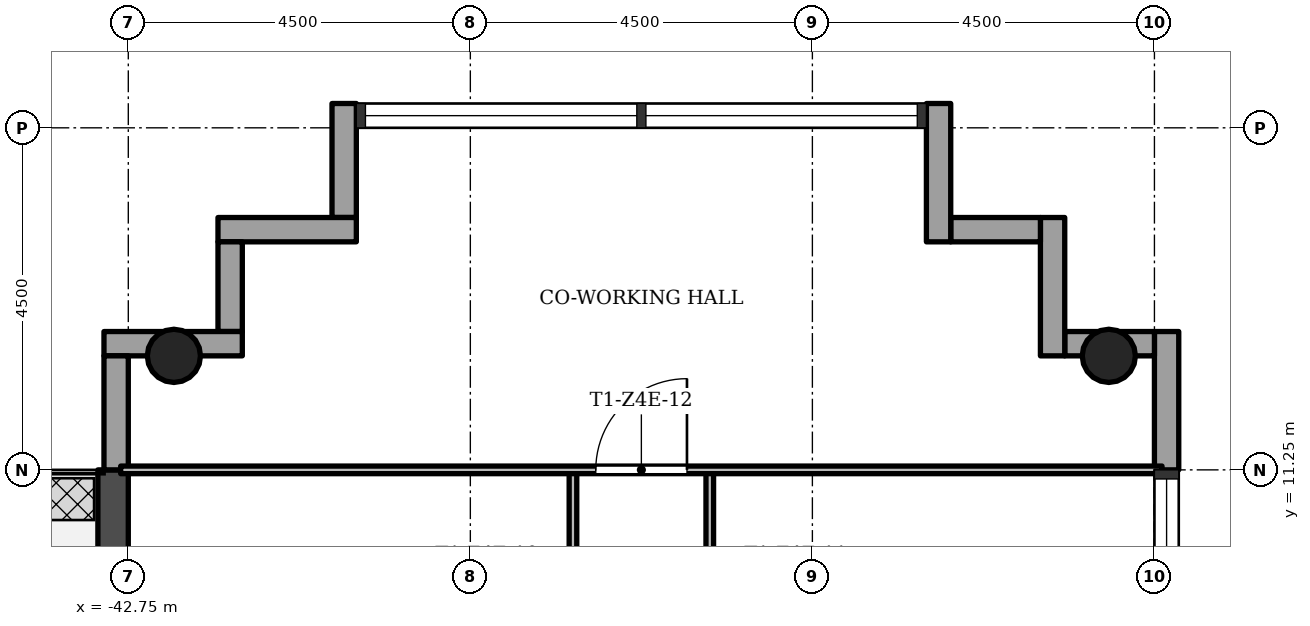
"""IFC4 building model, lengths in metres.
Left out: names, types, materials, properties, quantities, classifications, styles, units other than length and angle.
Written with IfcOpenShell. Run it as: python <this file> out.ifc"""

import sys

from ifc_helpers import new_model, si_unit, direction, frame, frame_2d, origin, origin_2d, place, context, subcontext, project, spatial, rectangle, hollow_circle, extrude, element, fill, save


model = new_model("IFC4")
c1 = context("Model", 3, precision=1e-05, world=origin(), true_north=direction((0.0, 1.0)))
c2 = subcontext(c1, "Body", "Model", "MODEL_VIEW")
j1 = project(units=[si_unit("LENGTHUNIT", "METRE"), si_unit("PLANEANGLEUNIT", "RADIAN")], contexts=[c1])
p1 = place(None, origin())
s1 = spatial("IfcSite", under=j1, at=p1, CompositionType="ELEMENT")
p2 = place(p1, origin())
s2 = spatial("IfcBuilding", under=s1, at=p2, CompositionType="ELEMENT")
p3 = place(p2, frame((0.0, 0.0, 213.0)))
s3 = spatial("IfcBuildingStorey", under=s2, at=p3, CompositionType="ELEMENT", Elevation=213.0)
for number, where, z_axis, x_axis in (
    (1, (-29.85, 12.75, 0.0), (0.0, 0.0, 1.0), (1.0, 0.0, 0.0)),
    (2, (-42.15, 12.75, 0.0), (0.0, 0.0, 1.0), (1.0, 0.0, 0.0)),
):
    element("IfcColumn", number, at=place(p3, frame(where, z_axis=z_axis, x_axis=x_axis)), inside=s3, PredefinedType="COLUMN", context=c2, shape_type="SweptSolid", body=[
        extrude(hollow_circle(Radius=0.35, WallThickness=0.025, at=origin_2d()), origin(), (0.0, 0.0, 1.0), 3.4),
    ])
p4 = place(p3, frame((-29.09, 11.25, -0.3), z_axis=(0.0, 0.0, 1.0), x_axis=(0.0, 1.0, 0.0)))
e3 = element("IfcWall", 3, at=p4, inside=s3, PredefinedType="STANDARD", context=c2, shape_type="SweptSolid", body=[
    extrude(rectangle(XDim=1.82, YDim=0.32, at=frame_2d((0.91, 0.0))), origin(), (0.0, 0.0, 1.0), 3.4),
])
p5 = place(p3, frame((-29.25, 12.91, -0.3), z_axis=(0.0, 0.0, 1.0), x_axis=(-1.0, 0.0, 0.0)))
e4 = element("IfcWall", 4, at=p5, inside=s3, PredefinedType="STANDARD", context=c2, shape_type="SweptSolid", body=[
    extrude(rectangle(XDim=1.18, YDim=0.32, at=frame_2d((0.59, 0.0))), origin(), (0.0, 0.0, 1.0), 3.4),
])
p6 = place(p3, frame((-30.59, 12.75, -0.3), z_axis=(0.0, 0.0, 1.0), x_axis=(0.0, 1.0, 0.0)))
e5 = element("IfcWall", 5, at=p6, inside=s3, PredefinedType="STANDARD", context=c2, shape_type="SweptSolid", body=[
    extrude(rectangle(XDim=1.82, YDim=0.32, at=frame_2d((0.91, 0.0))), origin(), (0.0, 0.0, 1.0), 3.4),
])
p7 = place(p3, frame((-30.75, 14.41, -0.3), z_axis=(0.0, 0.0, 1.0), x_axis=(-1.0, 0.0, 0.0)))
e6 = element("IfcWall", 6, at=p7, inside=s3, PredefinedType="STANDARD", context=c2, shape_type="SweptSolid", body=[
    extrude(rectangle(XDim=1.18, YDim=0.32, at=frame_2d((0.59, 0.0))), origin(), (0.0, 0.0, 1.0), 3.4),
])
p8 = place(p3, frame((-32.09, 14.25, -0.3), z_axis=(0.0, 0.0, 1.0), x_axis=(0.0, 1.0, 0.0)))
e7 = element("IfcWall", 7, at=p8, inside=s3, PredefinedType="STANDARD", context=c2, shape_type="SweptSolid", body=[
    extrude(rectangle(XDim=1.82, YDim=0.32, at=frame_2d((0.91, 0.0))), origin(), (0.0, 0.0, 1.0), 3.4),
])
p9 = place(p3, frame((-39.91, 16.07, -0.3), z_axis=(0.0, 0.0, 1.0), x_axis=(0.0, -1.0, 0.0)))
e8 = element("IfcWall", 8, at=p9, inside=s3, PredefinedType="STANDARD", context=c2, shape_type="SweptSolid", body=[
    extrude(rectangle(XDim=1.5, YDim=0.32, at=frame_2d((0.75, 0.0))), origin(), (0.0, 0.0, 1.0), 3.4),
])
p10 = place(p3, frame((-39.75, 14.41, -0.3), z_axis=(0.0, 0.0, 1.0), x_axis=(-1.0, 0.0, 0.0)))
e9 = element("IfcWall", 9, at=p10, inside=s3, PredefinedType="STANDARD", context=c2, shape_type="SweptSolid", body=[
    extrude(rectangle(XDim=1.82, YDim=0.32, at=frame_2d((0.91, 0.0))), origin(), (0.0, 0.0, 1.0), 3.4),
])
p11 = place(p3, frame((-41.41, 14.25, -0.3), z_axis=(0.0, 0.0, 1.0), x_axis=(0.0, -1.0, 0.0)))
e10 = element("IfcWall", 10, at=p11, inside=s3, PredefinedType="STANDARD", context=c2, shape_type="SweptSolid", body=[
    extrude(rectangle(XDim=1.18, YDim=0.32, at=frame_2d((0.59, 0.0))), origin(), (0.0, 0.0, 1.0), 3.4),
])
p12 = place(p3, frame((-41.25, 12.91, -0.3), z_axis=(0.0, 0.0, 1.0), x_axis=(-1.0, 0.0, 0.0)))
e11 = element("IfcWall", 11, at=p12, inside=s3, PredefinedType="STANDARD", context=c2, shape_type="SweptSolid", body=[
    extrude(rectangle(XDim=1.82, YDim=0.32, at=frame_2d((0.91, 0.0))), origin(), (0.0, 0.0, 1.0), 3.4),
])
p13 = place(p3, frame((-42.91, 12.75, -0.3), z_axis=(0.0, 0.0, 1.0), x_axis=(0.0, -1.0, 0.0)))
e12 = element("IfcWall", 12, at=p13, inside=s3, PredefinedType="STANDARD", context=c2, shape_type="SweptSolid", body=[
    extrude(rectangle(XDim=1.5, YDim=0.32, at=frame_2d((0.75, 0.0))), origin(), (0.0, 0.0, 1.0), 3.4),
])
p14 = place(p3, frame((-42.95, 11.25, -0.02), z_axis=(0.0, 0.0, 1.0), x_axis=(0.0, -1.0, 0.0)))
e13 = element("IfcWall", 13, at=p14, inside=s3, PredefinedType="STANDARD", context=c2, shape_type="SweptSolid", body=[
    extrude(rectangle(XDim=4.5, YDim=0.4, at=frame_2d((2.25, 0.0))), origin(), (0.0, 0.0, 1.0), 3.12),
])
p15 = place(p14, frame((1.35, 0.0, 0.02)))
e14 = element("IfcOpeningElement", 14, at=p15, cuts=e13, PredefinedType="OPENING", context=c2, shape_type="SweptSolid", body=[
    extrude(rectangle(XDim=1.8, YDim=2.1, at=frame_2d((0.9, 1.05))), frame((0.0, 0.21, 0.0), z_axis=(0.0, -1.0, 0.0), x_axis=(1.0, 0.0, 0.0)), (0.0, 0.0, 1.0), 0.42),
])
p16 = place(p3, frame((-36.9, 4.5, 0.0), z_axis=(0.0, 0.0, 1.0), x_axis=(0.0, 1.0, 0.0)))
e15 = element("IfcWall", 15, at=p16, inside=s3, PredefinedType="PARTITIONING", context=c2, shape_type="SweptSolid", body=[
    extrude(rectangle(XDim=6.75, YDim=0.1, at=frame_2d((3.375, 0.0))), origin(), (0.0, 0.0, 1.0), 3.0),
])
p17 = place(p16, frame((4.05, 0.0, 0.0)))
e16 = element("IfcOpeningElement", 16, at=p17, cuts=e15, PredefinedType="OPENING", context=c2, shape_type="SweptSolid", body=[
    extrude(rectangle(XDim=0.9, YDim=2.1, at=frame_2d((0.45, 1.05))), frame((0.0, 0.06, 0.0), z_axis=(0.0, -1.0, 0.0), x_axis=(1.0, 0.0, 0.0)), (0.0, 0.0, 1.0), 0.12),
])
p18 = place(p3, frame((-35.1, 4.5, 0.0), z_axis=(0.0, 0.0, 1.0), x_axis=(0.0, 1.0, 0.0)))
e17 = element("IfcWall", 17, at=p18, inside=s3, PredefinedType="PARTITIONING", context=c2, shape_type="SweptSolid", body=[
    extrude(rectangle(XDim=6.75, YDim=0.1, at=frame_2d((3.375, 0.0))), origin(), (0.0, 0.0, 1.0), 3.0),
])
p19 = place(p18, frame((4.05, 0.0, 0.0)))
e18 = element("IfcOpeningElement", 18, at=p19, cuts=e17, PredefinedType="OPENING", context=c2, shape_type="SweptSolid", body=[
    extrude(rectangle(XDim=0.9, YDim=2.1, at=frame_2d((0.45, 1.05))), frame((0.0, 0.06, 0.0), z_axis=(0.0, -1.0, 0.0), x_axis=(1.0, 0.0, 0.0)), (0.0, 0.0, 1.0), 0.12),
])
p20 = place(p3, frame((-42.85, 11.25, 0.0), z_axis=(0.0, 0.0, 1.0), x_axis=(1.0, 0.0, 0.0)))
e19 = element("IfcWall", 19, at=p20, inside=s3, PredefinedType="PARTITIONING", context=c2, shape_type="SweptSolid", body=[
    extrude(rectangle(XDim=13.7, YDim=0.1, at=frame_2d((6.85, 0.0))), origin(), (0.0, 0.0, 1.0), 3.0),
])
p21 = place(p20, frame((6.25, 0.0, 0.0)))
e20 = element("IfcOpeningElement", 20, at=p21, cuts=e19, PredefinedType="OPENING", context=c2, shape_type="SweptSolid", body=[
    extrude(rectangle(XDim=1.2, YDim=2.1, at=frame_2d((0.6, 1.05))), frame((0.0, 0.06, 0.0), z_axis=(0.0, -1.0, 0.0), x_axis=(1.0, 0.0, 0.0)), (0.0, 0.0, 1.0), 0.12),
])
p22 = place(p21, origin())
e21 = element("IfcDoor", 21, at=p22, inside=s3, OperationType="SINGLE_SWING_LEFT", PredefinedType="DOOR", context=c2, shape_type="SweptSolid", body=[
    extrude(rectangle(XDim=1.2, YDim=2.1, at=frame_2d((0.6, 1.05))), frame((0.0, 0.025, 0.0), z_axis=(0.0, -1.0, 0.0), x_axis=(1.0, 0.0, 0.0)), (0.0, 0.0, 1.0), 0.05),
])
fill(e20, e21)
save(model, sys.argv[1])
